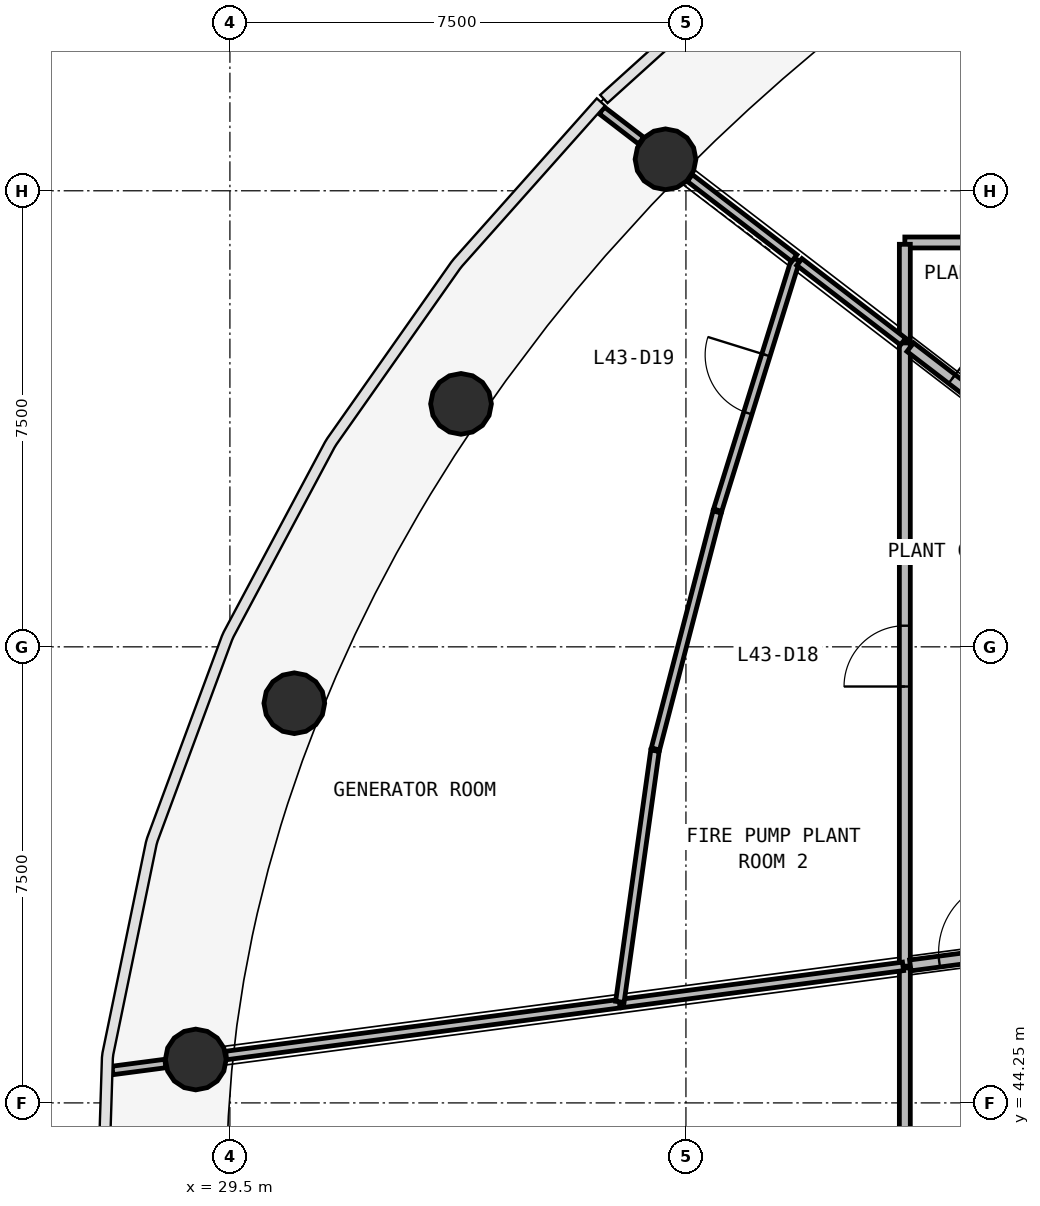
"""IFC4 building model, lengths in metres.
Left out: names, types, materials, properties, quantities, classifications, styles, units other than length and angle.
Written with IfcOpenShell. Run it as: python <this file> out.ifc"""

import sys

from ifc_helpers import new_model, si_unit, direction, frame, frame_2d, origin, origin_2d, place, context, subcontext, project, spatial, rectangle, circle, extrude, source, transform, mapped, element, fill, save


model = new_model("IFC4")
c1 = context("Model", 3, precision=1e-05, world=origin(), true_north=direction((0.0, 1.0)))
c2 = subcontext(c1, "Body", "Model", "MODEL_VIEW")
j1 = project(units=[si_unit("LENGTHUNIT", "METRE"), si_unit("PLANEANGLEUNIT", "RADIAN")], contexts=[c1])
p1 = place(None, origin())
s1 = spatial("IfcSite", under=j1, at=p1, CompositionType="ELEMENT")
p2 = place(p1, origin())
s2 = spatial("IfcBuilding", under=s1, at=p2, CompositionType="ELEMENT")
p3 = place(p2, frame((0.0, 0.0, 179.9)))
s3 = spatial("IfcBuildingStorey", under=s2, at=p3, CompositionType="ELEMENT", Elevation=179.9)
m1 = source(origin(), c2, "Body", "SweptSolid", [
    extrude(circle(Radius=0.5, at=origin_2d()), origin(), (0.0, 0.0, 1.0), 3.58),
])
for number, where, z_axis, x_axis in (
    (1, (36.664, 59.768, 0.0), (0.0, 0.0, 1.0), (1.0, 0.0, 0.0)),
    (2, (33.301, 55.746, 0.0), (0.0, 0.0, 1.0), (1.0, 0.0, 0.0)),
    (3, (30.559, 50.823, 0.0), (0.0, 0.0, 1.0), (1.0, 0.0, 0.0)),
    (4, (28.938, 44.964, 0.0), (0.0, 0.0, 1.0), (1.0, 0.0, 0.0)),
):
    element("IfcColumn", number, at=place(p3, frame(where, z_axis=z_axis, x_axis=x_axis)), inside=s3, PredefinedType="COLUMN", context=c2, shape_type="MappedRepresentation", body=[
        mapped(m1, transform((0.0, 0.0, 0.0), scale=1.0)),
    ])
p4 = place(p3, frame((40.6, 46.499, 0.0), z_axis=(0.0, 0.0, 1.0), x_axis=(0.0, 1.0, 0.0)))
e5 = element("IfcWall", 5, at=p4, inside=s3, PredefinedType="PARTITIONING", context=c2, shape_type="SweptSolid", body=[
    extrude(rectangle(XDim=10.248, YDim=0.18, at=frame_2d((5.124, 0.0))), origin(), (0.0, 0.0, 1.0), 2.38),
])
p5 = place(p4, frame((4.598, 0.0, 0.0)))
e6 = element("IfcOpeningElement", 6, at=p5, cuts=e5, PredefinedType="OPENING", context=c2, shape_type="SweptSolid", body=[
    extrude(rectangle(XDim=1.0, YDim=2.1, at=frame_2d((0.5, 1.05))), frame((0.0, 0.1, 0.0), z_axis=(0.0, -1.0, 0.0), x_axis=(1.0, 0.0, 0.0)), (0.0, 0.0, 1.0), 0.2),
])
p6 = place(p3, frame((40.6, 58.4, 0.0), z_axis=(0.0, 0.0, 1.0), x_axis=(1.0, 0.0, 0.0)))
e7 = element("IfcWall", 7, at=p6, inside=s3, PredefinedType="PARTITIONING", context=c2, shape_type="SweptSolid", body=[
    extrude(rectangle(XDim=10.031, YDim=0.18, at=frame_2d((5.015, 0.0))), origin(), (0.0, 0.0, 1.0), 2.38),
])
p7 = place(p6, frame((4.581, 0.0, 0.0)))
e8 = element("IfcOpeningElement", 8, at=p7, cuts=e7, PredefinedType="OPENING", context=c2, shape_type="SweptSolid", body=[
    extrude(rectangle(XDim=1.0, YDim=2.1, at=frame_2d((0.5, 1.05))), frame((0.0, 0.1, 0.0), z_axis=(0.0, -1.0, 0.0), x_axis=(1.0, 0.0, 0.0)), (0.0, 0.0, 1.0), 0.2),
])
p8 = place(p3, frame((40.6, 46.469, 0.0), z_axis=(0.0, 0.0, 1.0), x_axis=(0.0, -1.0, 0.0)))
e9 = element("IfcWall", 9, at=p8, inside=s3, PredefinedType="PARTITIONING", context=c2, shape_type="SweptSolid", body=[
    extrude(rectangle(XDim=8.869, YDim=0.18, at=frame_2d((4.435, 0.0))), origin(), (0.0, 0.0, 1.0), 2.38),
])
p9 = place(p3, frame((40.69, 56.678, 0.0), z_axis=(0.0, 0.0, 1.0), x_axis=(0.793371480341, -0.608737787706, 0.0)))
e10 = element("IfcWall", 10, at=p9, inside=s3, PredefinedType="PARTITIONING", context=c2, shape_type="SweptSolid", body=[
    extrude(rectangle(XDim=2.912, YDim=0.18, at=frame_2d((1.456, 0.0))), origin(), (0.0, 0.0, 1.0), 2.38),
])
p10 = place(p9, frame((0.862, 0.0, 0.0)))
e11 = element("IfcOpeningElement", 11, at=p10, cuts=e10, PredefinedType="OPENING", context=c2, shape_type="SweptSolid", body=[
    extrude(rectangle(XDim=1.2, YDim=2.1, at=frame_2d((0.6, 1.05))), frame((0.0, 0.1, 0.0), z_axis=(0.0, -1.0, 0.0), x_axis=(1.0, 0.0, 0.0)), (0.0, 0.0, 1.0), 0.2),
])
p11 = place(p3, frame((40.69, 46.511, 0.0), z_axis=(0.0, 0.0, 1.0), x_axis=(0.991440737811, 0.130557509967, 0.0)))
e12 = element("IfcWall", 12, at=p11, inside=s3, PredefinedType="PARTITIONING", context=c2, shape_type="SweptSolid", body=[
    extrude(rectangle(XDim=2.33, YDim=0.18, at=frame_2d((1.165, 0.0))), origin(), (0.0, 0.0, 1.0), 2.38),
])
p12 = place(p11, frame((0.48, 0.0, 0.0)))
e13 = element("IfcOpeningElement", 13, at=p12, cuts=e12, PredefinedType="OPENING", context=c2, shape_type="SweptSolid", body=[
    extrude(rectangle(XDim=1.2, YDim=2.1, at=frame_2d((0.6, 1.05))), frame((0.0, 0.1, 0.0), z_axis=(0.0, -1.0, 0.0), x_axis=(1.0, 0.0, 0.0)), (0.0, 0.0, 1.0), 0.2),
])
p13 = place(p3, frame((40.6, 58.37, 0.0), z_axis=(0.0, 0.0, 1.0), x_axis=(0.0, -1.0, 0.0)))
e14 = element("IfcWall", 14, at=p13, inside=s3, PredefinedType="PARTITIONING", context=c2, shape_type="SweptSolid", body=[
    extrude(rectangle(XDim=1.593, YDim=0.18, at=frame_2d((0.796, 0.0))), origin(), (0.0, 0.0, 1.0), 2.38),
])
p14 = place(p3, frame((35.909, 45.882, 0.0), z_axis=(0.0, 0.0, 1.0), x_axis=(-0.991447036881, -0.130509666541, 0.0)))
e15 = element("IfcWall", 15, at=p14, inside=s3, PredefinedType="PARTITIONING", context=c2, shape_type="SweptSolid", body=[
    extrude(rectangle(XDim=6.527, YDim=0.14, at=frame_2d((3.263, 0.0))), origin(), (0.0, 0.0, 1.0), 2.38),
])
p15 = place(p3, frame((40.57, 46.495, 0.0), z_axis=(0.0, 0.0, 1.0), x_axis=(-0.991448780362, -0.130496421093, 0.0)))
e16 = element("IfcWall", 16, at=p15, inside=s3, PredefinedType="PARTITIONING", context=c2, shape_type="SweptSolid", body=[
    extrude(rectangle(XDim=4.672, YDim=0.14, at=frame_2d((2.336, 0.0))), origin(), (0.0, 0.0, 1.0), 2.38),
])
p16 = place(p3, frame((37.521, 53.997, 0.0), z_axis=(0.0, 0.0, 1.0), x_axis=(0.297235933426, 0.954804063607, 0.0)))
e17 = element("IfcWall", 17, at=p16, inside=s3, PredefinedType="PARTITIONING", context=c2, shape_type="SweptSolid", body=[
    extrude(rectangle(XDim=4.322, YDim=0.14, at=frame_2d((2.161, 0.0))), origin(), (0.0, 0.0, 1.0), 2.38),
])
p17 = place(p16, frame((1.672, 0.0, 0.0)))
e18 = element("IfcOpeningElement", 18, at=p17, cuts=e17, PredefinedType="OPENING", context=c2, shape_type="SweptSolid", body=[
    extrude(rectangle(XDim=1.0, YDim=2.1, at=frame_2d((0.5, 1.05))), frame((0.0, 0.08, 0.0), z_axis=(0.0, -1.0, 0.0), x_axis=(1.0, 0.0, 0.0)), (0.0, 0.0, 1.0), 0.16),
])
p18 = place(p3, frame((36.491, 50.042, 0.0), z_axis=(0.0, 0.0, 1.0), x_axis=(-0.138560575964, -0.990353960354, 0.0)))
e19 = element("IfcWall", 19, at=p18, inside=s3, PredefinedType="PARTITIONING", context=c2, shape_type="SweptSolid", body=[
    extrude(rectangle(XDim=4.171, YDim=0.14, at=frame_2d((2.085, 0.0))), origin(), (0.0, 0.0, 1.0), 2.38),
])
p19 = place(p3, frame((37.514, 53.968, 0.0), z_axis=(0.0, 0.0, 1.0), x_axis=(-0.252051730305, -0.967713762045, 0.0)))
e20 = element("IfcWall", 20, at=p19, inside=s3, PredefinedType="PARTITIONING", context=c2, shape_type="SweptSolid", body=[
    extrude(rectangle(XDim=4.028, YDim=0.14, at=frame_2d((2.014, 0.0))), origin(), (0.0, 0.0, 1.0), 2.38),
])
p20 = place(p3, frame((40.571, 56.77, 0.0), z_axis=(0.0, 0.0, 1.0), x_axis=(-0.79337054143, 0.608739011393, 0.0)))
e21 = element("IfcWall", 21, at=p20, inside=s3, PredefinedType="PARTITIONING", context=c2, shape_type="SweptSolid", body=[
    extrude(rectangle(XDim=2.15, YDim=0.14, at=frame_2d((1.075, 0.0))), origin(), (0.0, 0.0, 1.0), 2.38),
])
p21 = place(p3, frame((38.782, 58.142, 0.0), z_axis=(0.0, 0.0, 1.0), x_axis=(-0.793323252824, 0.608800637753, 0.0)))
e22 = element("IfcWall", 22, at=p21, inside=s3, PredefinedType="PARTITIONING", context=c2, shape_type="SweptSolid", body=[
    extrude(rectangle(XDim=2.166, YDim=0.14, at=frame_2d((1.083, 0.0))), origin(), (0.0, 0.0, 1.0), 2.38),
])
p22 = place(p3, frame((28.438, 44.898, 0.0), z_axis=(0.0, 0.0, 1.0), x_axis=(-0.991459985339, -0.130411262827, 0.0)))
e23 = element("IfcWall", 23, at=p22, inside=s3, PredefinedType="PARTITIONING", context=c2, shape_type="SweptSolid", body=[
    extrude(rectangle(XDim=0.876, YDim=0.14, at=frame_2d((0.438, 0.0))), origin(), (0.0, 0.0, 1.0), 2.88),
])
p23 = place(p3, frame((36.263, 60.075, 0.0), z_axis=(0.0, 0.0, 1.0), x_axis=(-0.79344724315, 0.608639032873, 0.0)))
e24 = element("IfcWall", 24, at=p23, inside=s3, PredefinedType="PARTITIONING", context=c2, shape_type="SweptSolid", body=[
    extrude(rectangle(XDim=0.815, YDim=0.14, at=frame_2d((0.408, 0.0))), origin(), (0.0, 0.0, 1.0), 2.88),
])
m2 = source(origin(), c2, "Body", "SweptSolid", [
    extrude(rectangle(XDim=1.0, YDim=2.1, at=frame_2d((0.5, 1.05))), frame((0.0, 0.025, 0.0), z_axis=(0.0, -1.0, 0.0), x_axis=(1.0, 0.0, 0.0)), (0.0, 0.0, 1.0), 0.05),
])
p24 = place(p5, origin())
e25 = element("IfcDoor", 25, at=p24, inside=s3, OperationType="SINGLE_SWING_LEFT", PredefinedType="DOOR", context=c2, shape_type="MappedRepresentation", body=[
    mapped(m2, transform((0.0, 0.0, 0.0), scale=1.0)),
])
fill(e6, e25)
p25 = place(p17, origin())
e26 = element("IfcDoor", 26, at=p25, inside=s3, OperationType="SINGLE_SWING_RIGHT", PredefinedType="DOOR", context=c2, shape_type="MappedRepresentation", body=[
    mapped(m2, transform((0.0, 0.0, 0.0), scale=1.0)),
])
fill(e18, e26)
m3 = source(origin(), c2, "Body", "SweptSolid", [
    extrude(rectangle(XDim=1.2, YDim=2.1, at=frame_2d((0.6, 1.05))), frame((0.0, 0.025, 0.0), z_axis=(0.0, -1.0, 0.0), x_axis=(1.0, 0.0, 0.0)), (0.0, 0.0, 1.0), 0.05),
])
p26 = place(p10, origin())
e27 = element("IfcDoor", 27, at=p26, inside=s3, OperationType="SINGLE_SWING_LEFT", PredefinedType="DOOR", context=c2, shape_type="MappedRepresentation", body=[
    mapped(m3, transform((0.0, 0.0, 0.0), scale=1.0)),
])
fill(e11, e27)
p27 = place(p12, origin())
e28 = element("IfcDoor", 28, at=p27, inside=s3, OperationType="SINGLE_SWING_RIGHT", PredefinedType="DOOR", context=c2, shape_type="MappedRepresentation", body=[
    mapped(m3, transform((0.0, 0.0, 0.0), scale=1.0)),
])
fill(e13, e28)
save(model, sys.argv[1])
